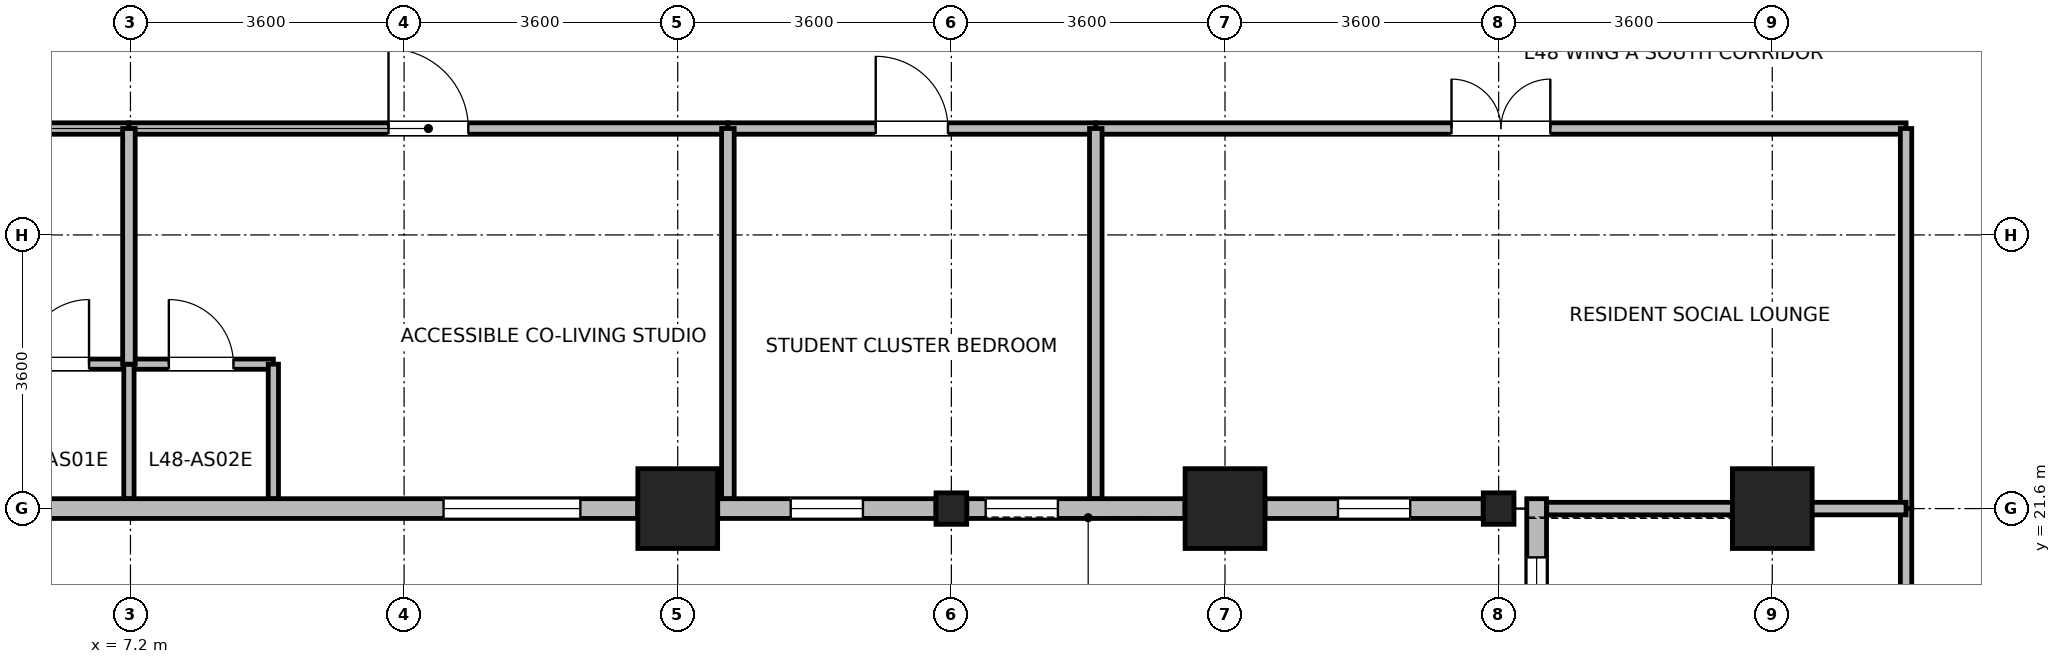
"""IFC4 building model, lengths in metres.
Left out: names, types, materials, properties, quantities, classifications, styles, units other than length and angle.
Written with IfcOpenShell. Run it as: python <this file> out.ifc"""

import sys

from ifc_helpers import new_model, si_unit, direction, frame, frame_2d, origin, origin_2d, place, context, subcontext, project, spatial, rectangle, i_section, extrude, source, transform, mapped, element, fill, save


model = new_model("IFC4")
c1 = context("Model", 3, precision=1e-05, world=origin(), true_north=direction((0.0, 1.0)))
c2 = subcontext(c1, "Body", "Model", "MODEL_VIEW")
j1 = project(units=[si_unit("LENGTHUNIT", "METRE"), si_unit("PLANEANGLEUNIT", "RADIAN")], contexts=[c1])
p1 = place(None, origin())
s1 = spatial("IfcSite", under=j1, at=p1, CompositionType="ELEMENT")
p2 = place(p1, origin())
s2 = spatial("IfcBuilding", under=s1, at=p2, CompositionType="ELEMENT")
p3 = place(p2, frame((0.0, 0.0, 188.3)))
s3 = spatial("IfcBuildingStorey", under=s2, at=p3, CompositionType="ELEMENT", Elevation=188.3)
m1 = source(origin(), c2, "Body", "SweptSolid", [
    extrude(rectangle(XDim=1.05, YDim=1.05, at=origin_2d()), origin(), (0.0, 0.0, 1.0), 3.7),
])
for number, where, z_axis, x_axis in (
    (1, (14.4, 21.6, 0.0), (0.0, 0.0, 1.0), (1.0, 0.0, 0.0)),
    (2, (21.6, 21.6, 0.0), (0.0, 0.0, 1.0), (1.0, 0.0, 0.0)),
    (3, (28.8, 21.6, 0.0), (0.0, 0.0, 1.0), (1.0, 0.0, 0.0)),
):
    element("IfcColumn", number, at=place(p3, frame(where, z_axis=z_axis, x_axis=x_axis)), inside=s3, PredefinedType="COLUMN", context=c2, shape_type="MappedRepresentation", body=[
        mapped(m1, transform((0.0, 0.0, 0.0), x_axis=(1.0, 0.0, 0.0), y_axis=(0.0, 1.0, 0.0), z_axis=(0.0, 0.0, 1.0), scale=1.0)),
    ])
m2 = source(origin(), c2, "Body", "SweptSolid", [
    extrude(i_section(OverallWidth=0.404, OverallDepth=0.414, WebThickness=0.021, FlangeThickness=0.028, FilletRadius=0.015, at=origin_2d()), origin(), (0.0, 0.0, 1.0), 3.7),
])
for number, where, z_axis, x_axis in (
    (4, (18.0, 21.6, 0.0), (0.0, 0.0, 1.0), (1.0, 0.0, 0.0)),
    (5, (25.2, 21.6, 0.0), (0.0, 0.0, 1.0), (1.0, 0.0, 0.0)),
):
    element("IfcColumn", number, at=place(p3, frame(where, z_axis=z_axis, x_axis=x_axis)), inside=s3, PredefinedType="COLUMN", context=c2, shape_type="MappedRepresentation", body=[
        mapped(m2, transform((0.0, 0.0, 0.0), x_axis=(1.0, 0.0, 0.0), y_axis=(0.0, 1.0, 0.0), z_axis=(0.0, 0.0, 1.0), scale=1.0)),
    ])
p4 = place(p3, frame((13.874, 21.6, 0.0), z_axis=(0.0, 0.0, 1.0), x_axis=(-1.0, 0.0, 0.0)))
e6 = element("IfcWall", 6, at=p4, inside=s3, PredefinedType="STANDARD", context=c2, shape_type="SweptSolid", body=[
    extrude(rectangle(XDim=13.239, YDim=0.26, at=frame_2d((6.62, 0.0))), origin(), (0.0, 0.0, 1.0), 3.32),
])
p5 = place(p4, frame((0.755, 0.0, 0.85)))
e7 = element("IfcOpeningElement", 7, at=p5, cuts=e6, PredefinedType="OPENING", context=c2, shape_type="SweptSolid", body=[
    extrude(rectangle(XDim=1.8, YDim=1.85, at=frame_2d((0.9, 0.925))), frame((0.0, 0.14, 0.0), z_axis=(0.0, -1.0, 0.0), x_axis=(1.0, 0.0, 0.0)), (0.0, 0.0, 1.0), 0.28),
])
p6 = place(p4, frame((10.684, 0.0, 0.85)))
e8 = element("IfcOpeningElement", 8, at=p6, cuts=e6, PredefinedType="OPENING", context=c2, shape_type="SweptSolid", body=[
    extrude(rectangle(XDim=1.8, YDim=1.85, at=frame_2d((0.9, 0.925))), frame((0.0, 0.14, 0.0), z_axis=(0.0, -1.0, 0.0), x_axis=(1.0, 0.0, 0.0)), (0.0, 0.0, 1.0), 0.28),
])
p7 = place(p3, frame((17.797, 21.6, 0.0), z_axis=(0.0, 0.0, 1.0), x_axis=(-1.0, 0.0, 0.0)))
e9 = element("IfcWall", 9, at=p7, inside=s3, PredefinedType="STANDARD", context=c2, shape_type="SweptSolid", body=[
    extrude(rectangle(XDim=2.871, YDim=0.26, at=frame_2d((1.436, 0.0))), origin(), (0.0, 0.0, 1.0), 2.87),
])
p8 = place(p7, frame((0.96, 0.0, 0.85)))
e10 = element("IfcOpeningElement", 10, at=p8, cuts=e9, PredefinedType="OPENING", context=c2, shape_type="SweptSolid", body=[
    extrude(rectangle(XDim=0.95, YDim=1.75, at=frame_2d((0.475, 0.875))), frame((0.0, 0.14, 0.0), z_axis=(0.0, -1.0, 0.0), x_axis=(1.0, 0.0, 0.0)), (0.0, 0.0, 1.0), 0.28),
])
p9 = place(p3, frame((21.074, 21.6, 0.0), z_axis=(0.0, 0.0, 1.0), x_axis=(-1.0, 0.0, 0.0)))
e11 = element("IfcWall", 11, at=p9, inside=s3, PredefinedType="STANDARD", context=c2, shape_type="SweptSolid", body=[
    extrude(rectangle(XDim=2.871, YDim=0.26, at=frame_2d((1.436, 0.0))), origin(), (0.0, 0.0, 1.0), 2.87),
])
p10 = place(p9, frame((1.673, 0.0, 0.85)))
e12 = element("IfcOpeningElement", 12, at=p10, cuts=e11, PredefinedType="OPENING", context=c2, shape_type="SweptSolid", body=[
    extrude(rectangle(XDim=0.95, YDim=1.75, at=frame_2d((0.475, 0.875))), frame((0.0, 0.14, 0.0), z_axis=(0.0, -1.0, 0.0), x_axis=(1.0, 0.0, 0.0)), (0.0, 0.0, 1.0), 0.28),
])
p11 = place(p3, frame((24.997, 21.6, 0.0), z_axis=(0.0, 0.0, 1.0), x_axis=(-1.0, 0.0, 0.0)))
e13 = element("IfcWall", 13, at=p11, inside=s3, PredefinedType="STANDARD", context=c2, shape_type="SweptSolid", body=[
    extrude(rectangle(XDim=2.871, YDim=0.26, at=frame_2d((1.436, 0.0))), origin(), (0.0, 0.0, 1.0), 2.87),
])
p12 = place(p11, frame((0.96, 0.0, 0.85)))
e14 = element("IfcOpeningElement", 14, at=p12, cuts=e13, PredefinedType="OPENING", context=c2, shape_type="SweptSolid", body=[
    extrude(rectangle(XDim=0.95, YDim=1.75, at=frame_2d((0.475, 0.875))), frame((0.0, 0.14, 0.0), z_axis=(0.0, -1.0, 0.0), x_axis=(1.0, 0.0, 0.0)), (0.0, 0.0, 1.0), 0.28),
])
p13 = place(p3, frame((25.7, 1.67, 0.0), z_axis=(0.0, 0.0, 1.0), x_axis=(0.0, 1.0, 0.0)))
e15 = element("IfcWall", 15, at=p13, inside=s3, PredefinedType="STANDARD", context=c2, shape_type="SweptSolid", body=[
    extrude(rectangle(XDim=20.06, YDim=0.26, at=frame_2d((10.03, 0.0))), origin(), (0.0, 0.0, 1.0), 3.32),
])
p14 = place(p13, frame((0.772, 0.0, 0.85)))
e16 = element("IfcOpeningElement", 16, at=p14, cuts=e15, PredefinedType="OPENING", context=c2, shape_type="SweptSolid", body=[
    extrude(rectangle(XDim=1.8, YDim=1.85, at=frame_2d((0.9, 0.925))), frame((0.0, 0.14, 0.0), z_axis=(0.0, -1.0, 0.0), x_axis=(1.0, 0.0, 0.0)), (0.0, 0.0, 1.0), 0.28),
])
p15 = place(p13, frame((7.458, 0.0, 0.85)))
e17 = element("IfcOpeningElement", 17, at=p15, cuts=e15, PredefinedType="OPENING", context=c2, shape_type="SweptSolid", body=[
    extrude(rectangle(XDim=1.8, YDim=1.85, at=frame_2d((0.9, 0.925))), frame((0.0, 0.14, 0.0), z_axis=(0.0, -1.0, 0.0), x_axis=(1.0, 0.0, 0.0)), (0.0, 0.0, 1.0), 0.28),
])
p16 = place(p13, frame((14.145, 0.0, 0.85)))
e18 = element("IfcOpeningElement", 18, at=p16, cuts=e15, PredefinedType="OPENING", context=c2, shape_type="SweptSolid", body=[
    extrude(rectangle(XDim=1.8, YDim=1.85, at=frame_2d((0.9, 0.925))), frame((0.0, 0.14, 0.0), z_axis=(0.0, -1.0, 0.0), x_axis=(1.0, 0.0, 0.0)), (0.0, 0.0, 1.0), 0.28),
])
p17 = place(p13, frame((17.488, 0.0, 0.85)))
e19 = element("IfcOpeningElement", 19, at=p17, cuts=e15, PredefinedType="OPENING", context=c2, shape_type="SweptSolid", body=[
    extrude(rectangle(XDim=1.8, YDim=1.85, at=frame_2d((0.9, 0.925))), frame((0.0, 0.14, 0.0), z_axis=(0.0, -1.0, 0.0), x_axis=(1.0, 0.0, 0.0)), (0.0, 0.0, 1.0), 0.28),
])
p18 = place(p3, frame((7.18, 23.5, 0.0), z_axis=(0.0, 0.0, 1.0), x_axis=(1.0, 0.0, 0.0)))
e20 = element("IfcWall", 20, at=p18, inside=s3, PredefinedType="PARTITIONING", context=c2, shape_type="SweptSolid", body=[
    extrude(rectangle(XDim=1.9, YDim=0.135, at=frame_2d((0.95, 0.0))), origin(), (0.0, 0.0, 1.0), 3.32),
])
p19 = place(p18, frame((0.525, 0.0, 0.0)))
e21 = element("IfcOpeningElement", 21, at=p19, cuts=e20, PredefinedType="OPENING", context=c2, shape_type="SweptSolid", body=[
    extrude(rectangle(XDim=0.85, YDim=2.04, at=frame_2d((0.425, 1.02))), frame((0.0, 0.078, 0.0), z_axis=(0.0, -1.0, 0.0), x_axis=(1.0, 0.0, 0.0)), (0.0, 0.0, 1.0), 0.155),
])
p20 = place(p3, frame((5.28, 23.5, 0.0), z_axis=(0.0, 0.0, 1.0), x_axis=(1.0, 0.0, 0.0)))
e22 = element("IfcWall", 22, at=p20, inside=s3, PredefinedType="PARTITIONING", context=c2, shape_type="SweptSolid", body=[
    extrude(rectangle(XDim=1.9, YDim=0.135, at=frame_2d((0.95, 0.0))), origin(), (0.0, 0.0, 1.0), 3.32),
])
p21 = place(p20, frame((0.525, 0.0, 0.0)))
e23 = element("IfcOpeningElement", 23, at=p21, cuts=e22, PredefinedType="OPENING", context=c2, shape_type="SweptSolid", body=[
    extrude(rectangle(XDim=0.85, YDim=2.04, at=frame_2d((0.425, 1.02))), frame((0.0, 0.078, 0.0), z_axis=(0.0, -1.0, 0.0), x_axis=(1.0, 0.0, 0.0)), (0.0, 0.0, 1.0), 0.155),
])
for number, where, z_axis, x_axis in (
    (24, (7.18, 21.732, 0.0), (0.0, 0.0, 1.0), (0.0, 1.0, 0.0)),
    (25, (9.08, 21.732, 0.0), (0.0, 0.0, 1.0), (0.0, 1.0, 0.0)),
):
    element("IfcWall", number, at=place(p3, frame(where, z_axis=z_axis, x_axis=x_axis)), inside=s3, PredefinedType="PARTITIONING", context=c2, shape_type="SweptSolid", body=[
        extrude(rectangle(XDim=1.768, YDim=0.135, at=frame_2d((0.884, 0.0))), origin(), (0.0, 0.0, 1.0), 3.32),
    ])
p22 = place(p3, frame((19.9, 26.6, 0.0), z_axis=(0.0, 0.0, 1.0), x_axis=(1.0, 0.0, 0.0)))
e26 = element("IfcWall", 26, at=p22, inside=s3, PredefinedType="PARTITIONING", context=c2, shape_type="SweptSolid", body=[
    extrude(rectangle(XDim=10.66, YDim=0.15, at=frame_2d((5.33, 0.0))), origin(), (0.0, 0.0, 1.0), 3.32),
])
p23 = place(p22, frame((4.68, 0.0, 0.0)))
e27 = element("IfcOpeningElement", 27, at=p23, cuts=e26, PredefinedType="OPENING", context=c2, shape_type="SweptSolid", body=[
    extrude(rectangle(XDim=1.3, YDim=2.12, at=frame_2d((0.65, 1.06))), frame((0.0, 0.085, 0.0), z_axis=(0.0, -1.0, 0.0), x_axis=(1.0, 0.0, 0.0)), (0.0, 0.0, 1.0), 0.17),
])
p24 = place(p3, frame((7.18, 26.6, 0.0), z_axis=(0.0, 0.0, 1.0), x_axis=(1.0, 0.0, 0.0)))
e28 = element("IfcWall", 28, at=p24, inside=s3, PredefinedType="PARTITIONING", context=c2, shape_type="SweptSolid", body=[
    extrude(rectangle(XDim=7.88, YDim=0.15, at=frame_2d((3.94, 0.0))), origin(), (0.0, 0.0, 1.0), 3.32),
])
p25 = place(p24, frame((3.415, 0.0, 0.0)))
e29 = element("IfcOpeningElement", 29, at=p25, cuts=e28, PredefinedType="OPENING", context=c2, shape_type="SweptSolid", body=[
    extrude(rectangle(XDim=1.05, YDim=2.12, at=frame_2d((0.525, 1.06))), frame((0.0, 0.085, 0.0), z_axis=(0.0, -1.0, 0.0), x_axis=(1.0, 0.0, 0.0)), (0.0, 0.0, 1.0), 0.17),
])
p26 = place(p3, frame((30.56, 14.5, 0.0), z_axis=(0.0, 0.0, 1.0), x_axis=(0.0, 1.0, 0.0)))
e30 = element("IfcWall", 30, at=p26, inside=s3, PredefinedType="PARTITIONING", context=c2, shape_type="SweptSolid", body=[
    extrude(rectangle(XDim=7.1, YDim=0.15, at=frame_2d((3.55, 0.0))), origin(), (0.0, 0.0, 1.0), 3.32),
])
p27 = place(p26, frame((2.9, 0.0, 0.0)))
e31 = element("IfcOpeningElement", 31, at=p27, cuts=e30, PredefinedType="OPENING", context=c2, shape_type="SweptSolid", body=[
    extrude(rectangle(XDim=1.3, YDim=2.12, at=frame_2d((0.65, 1.06))), frame((0.0, 0.085, 0.0), z_axis=(0.0, -1.0, 0.0), x_axis=(1.0, 0.0, 0.0)), (0.0, 0.0, 1.0), 0.17),
])
p28 = place(p3, frame((0.632, 26.6, 0.0), z_axis=(0.0, 0.0, 1.0), x_axis=(1.0, 0.0, 0.0)))
e32 = element("IfcWall", 32, at=p28, inside=s3, PredefinedType="PARTITIONING", context=c2, shape_type="SweptSolid", body=[
    extrude(rectangle(XDim=6.548, YDim=0.15, at=frame_2d((3.274, 0.0))), origin(), (0.0, 0.0, 1.0), 3.32),
])
p29 = place(p28, frame((2.799, 0.0, 0.0)))
e33 = element("IfcOpeningElement", 33, at=p29, cuts=e32, PredefinedType="OPENING", context=c2, shape_type="SweptSolid", body=[
    extrude(rectangle(XDim=0.95, YDim=2.1, at=frame_2d((0.475, 1.05))), frame((0.0, 0.085, 0.0), z_axis=(0.0, -1.0, 0.0), x_axis=(1.0, 0.0, 0.0)), (0.0, 0.0, 1.0), 0.17),
])
p30 = place(p3, frame((30.56, 21.6, 0.0), z_axis=(0.0, 0.0, 1.0), x_axis=(0.0, 1.0, 0.0)))
e34 = element("IfcWall", 34, at=p30, inside=s3, PredefinedType="PARTITIONING", context=c2, shape_type="SweptSolid", body=[
    extrude(rectangle(XDim=5.0, YDim=0.15, at=frame_2d((2.5, 0.0))), origin(), (0.0, 0.0, 1.0), 3.32),
])
p31 = place(p3, frame((15.06, 26.6, 0.0), z_axis=(0.0, 0.0, 1.0), x_axis=(1.0, 0.0, 0.0)))
e35 = element("IfcWall", 35, at=p31, inside=s3, PredefinedType="PARTITIONING", context=c2, shape_type="SweptSolid", body=[
    extrude(rectangle(XDim=4.84, YDim=0.15, at=frame_2d((2.42, 0.0))), origin(), (0.0, 0.0, 1.0), 3.32),
])
p32 = place(p31, frame((1.945, 0.0, 0.0)))
e36 = element("IfcOpeningElement", 36, at=p32, cuts=e35, PredefinedType="OPENING", context=c2, shape_type="SweptSolid", body=[
    extrude(rectangle(XDim=0.95, YDim=2.1, at=frame_2d((0.475, 1.05))), frame((0.0, 0.085, 0.0), z_axis=(0.0, -1.0, 0.0), x_axis=(1.0, 0.0, 0.0)), (0.0, 0.0, 1.0), 0.17),
])
for number, where, z_axis, x_axis in (
    (37, (15.06, 21.732, 0.0), (0.0, 0.0, 1.0), (0.0, 1.0, 0.0)),
    (38, (19.9, 21.732, 0.0), (0.0, 0.0, 1.0), (0.0, 1.0, 0.0)),
):
    element("IfcWall", number, at=place(p3, frame(where, z_axis=z_axis, x_axis=x_axis)), inside=s3, PredefinedType="PARTITIONING", context=c2, shape_type="SweptSolid", body=[
        extrude(rectangle(XDim=4.868, YDim=0.165, at=frame_2d((2.434, 0.0))), origin(), (0.0, 0.0, 1.0), 3.32),
    ])
p33 = place(p3, frame((25.832, 21.6, 0.0), z_axis=(0.0, 0.0, 1.0), x_axis=(1.0, 0.0, 0.0)))
e39 = element("IfcWall", 39, at=p33, inside=s3, PredefinedType="PARTITIONING", context=c2, shape_type="SweptSolid", body=[
    extrude(rectangle(XDim=4.728, YDim=0.165, at=frame_2d((2.364, 0.0))), origin(), (0.0, 0.0, 1.0), 2.87),
])
p34 = place(p3, frame((7.18, 23.5, 0.0), z_axis=(0.0, 0.0, 1.0), x_axis=(0.0, 1.0, 0.0)))
e40 = element("IfcWall", 40, at=p34, inside=s3, PredefinedType="PARTITIONING", context=c2, shape_type="SweptSolid", body=[
    extrude(rectangle(XDim=3.1, YDim=0.165, at=frame_2d((1.55, 0.0))), origin(), (0.0, 0.0, 1.0), 3.32),
])
p35 = place(p5, origin())
e41 = element("IfcWindow", 41, at=p35, inside=s3, PartitioningType="SINGLE_PANEL", PredefinedType="WINDOW", context=c2, shape_type="SweptSolid", body=[
    extrude(rectangle(XDim=1.8, YDim=1.85, at=frame_2d((0.9, 0.925))), frame((0.0, 0.03, 0.0), z_axis=(0.0, -1.0, 0.0), x_axis=(1.0, 0.0, 0.0)), (0.0, 0.0, 1.0), 0.06),
])
fill(e7, e41)
p36 = place(p8, origin())
e42 = element("IfcWindow", 42, at=p36, inside=s3, PartitioningType="SINGLE_PANEL", PredefinedType="WINDOW", context=c2, shape_type="SweptSolid", body=[
    extrude(rectangle(XDim=0.95, YDim=1.75, at=frame_2d((0.475, 0.875))), frame((0.0, 0.03, 0.0), z_axis=(0.0, -1.0, 0.0), x_axis=(1.0, 0.0, 0.0)), (0.0, 0.0, 1.0), 0.06),
])
fill(e10, e42)
p37 = place(p10, origin())
e43 = element("IfcWindow", 43, at=p37, inside=s3, PartitioningType="SINGLE_PANEL", PredefinedType="WINDOW", context=c2, shape_type="SweptSolid", body=[
    extrude(rectangle(XDim=0.95, YDim=1.75, at=frame_2d((0.475, 0.875))), frame((0.0, 0.03, 0.0), z_axis=(0.0, -1.0, 0.0), x_axis=(1.0, 0.0, 0.0)), (0.0, 0.0, 1.0), 0.06),
])
fill(e12, e43)
p38 = place(p12, origin())
e44 = element("IfcWindow", 44, at=p38, inside=s3, PartitioningType="SINGLE_PANEL", PredefinedType="WINDOW", context=c2, shape_type="SweptSolid", body=[
    extrude(rectangle(XDim=0.95, YDim=1.75, at=frame_2d((0.475, 0.875))), frame((0.0, 0.03, 0.0), z_axis=(0.0, -1.0, 0.0), x_axis=(1.0, 0.0, 0.0)), (0.0, 0.0, 1.0), 0.06),
])
fill(e14, e44)
p39 = place(p17, origin())
e45 = element("IfcWindow", 45, at=p39, inside=s3, PartitioningType="SINGLE_PANEL", PredefinedType="WINDOW", context=c2, shape_type="SweptSolid", body=[
    extrude(rectangle(XDim=1.8, YDim=1.85, at=frame_2d((0.9, 0.925))), frame((0.0, 0.03, 0.0), z_axis=(0.0, -1.0, 0.0), x_axis=(1.0, 0.0, 0.0)), (0.0, 0.0, 1.0), 0.06),
])
fill(e19, e45)
p40 = place(p19, origin())
e46 = element("IfcDoor", 46, at=p40, inside=s3, OperationType="SINGLE_SWING_LEFT", PredefinedType="DOOR", context=c2, shape_type="SweptSolid", body=[
    extrude(rectangle(XDim=0.85, YDim=2.04, at=frame_2d((0.425, 1.02))), frame((0.0, 0.025, 0.0), z_axis=(0.0, -1.0, 0.0), x_axis=(1.0, 0.0, 0.0)), (0.0, 0.0, 1.0), 0.05),
])
fill(e21, e46)
p41 = place(p21, origin())
e47 = element("IfcDoor", 47, at=p41, inside=s3, OperationType="SINGLE_SWING_RIGHT", PredefinedType="DOOR", context=c2, shape_type="SweptSolid", body=[
    extrude(rectangle(XDim=0.85, YDim=2.04, at=frame_2d((0.425, 1.02))), frame((0.0, 0.025, 0.0), z_axis=(0.0, -1.0, 0.0), x_axis=(1.0, 0.0, 0.0)), (0.0, 0.0, 1.0), 0.05),
])
fill(e23, e47)
p42 = place(p23, origin())
e48 = element("IfcDoor", 48, at=p42, inside=s3, OperationType="DOUBLE_DOOR_SINGLE_SWING", PredefinedType="DOOR", context=c2, shape_type="SweptSolid", body=[
    extrude(rectangle(XDim=1.3, YDim=2.12, at=frame_2d((0.65, 1.06))), frame((0.0, 0.025, 0.0), z_axis=(0.0, -1.0, 0.0), x_axis=(1.0, 0.0, 0.0)), (0.0, 0.0, 1.0), 0.05),
])
fill(e27, e48)
p43 = place(p25, origin())
e49 = element("IfcDoor", 49, at=p43, inside=s3, OperationType="SINGLE_SWING_LEFT", PredefinedType="DOOR", context=c2, shape_type="SweptSolid", body=[
    extrude(rectangle(XDim=1.05, YDim=2.12, at=frame_2d((0.525, 1.06))), frame((0.0, 0.025, 0.0), z_axis=(0.0, -1.0, 0.0), x_axis=(1.0, 0.0, 0.0)), (0.0, 0.0, 1.0), 0.05),
])
fill(e29, e49)
p44 = place(p32, origin())
e50 = element("IfcDoor", 50, at=p44, inside=s3, OperationType="SINGLE_SWING_LEFT", PredefinedType="DOOR", context=c2, shape_type="SweptSolid", body=[
    extrude(rectangle(XDim=0.95, YDim=2.1, at=frame_2d((0.475, 1.05))), frame((0.0, 0.025, 0.0), z_axis=(0.0, -1.0, 0.0), x_axis=(1.0, 0.0, 0.0)), (0.0, 0.0, 1.0), 0.05),
])
fill(e36, e50)
save(model, sys.argv[1])
